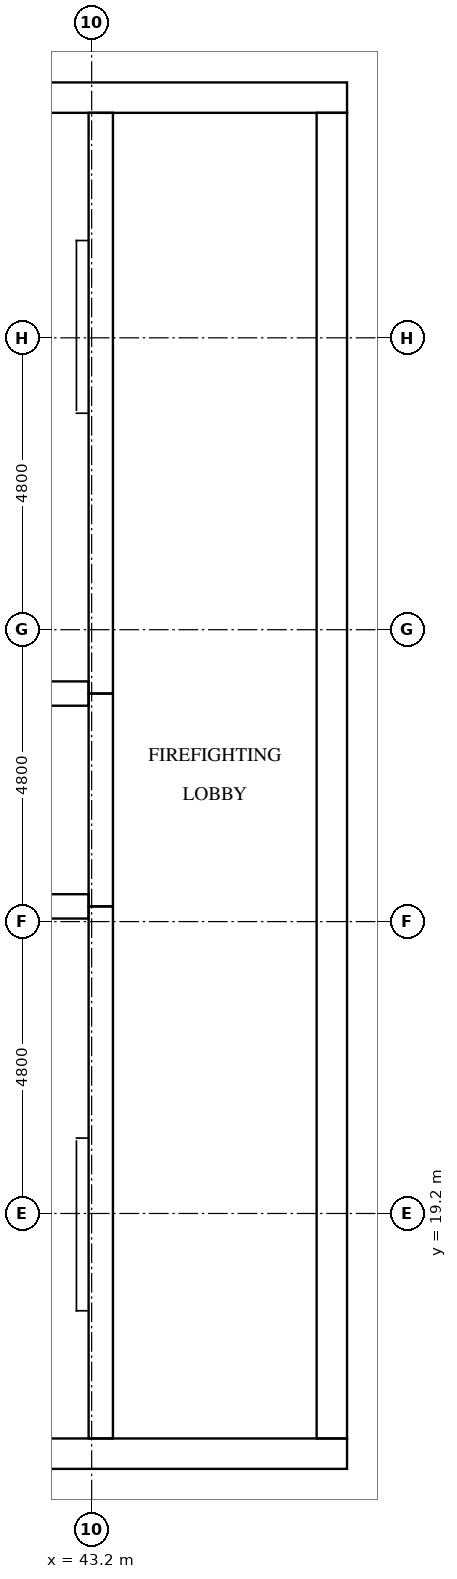
"""IFC4 building model, lengths in metres.
Left out: names, types, materials, properties, quantities, classifications, styles, units other than length and angle.
Written with IfcOpenShell. Run it as: python <this file> out.ifc"""

import sys

from ifc_helpers import new_model, si_unit, direction, frame, frame_2d, origin, place, context, subcontext, project, spatial, rectangle, extrude, element, fill, save


model = new_model("IFC4")
c1 = context("Model", 3, precision=1e-05, world=origin(), true_north=direction((0.0, 1.0)))
c2 = subcontext(c1, "Body", "Model", "MODEL_VIEW")
j1 = project(units=[si_unit("LENGTHUNIT", "METRE"), si_unit("PLANEANGLEUNIT", "RADIAN")], contexts=[c1])
p1 = place(None, origin())
s1 = spatial("IfcSite", under=j1, at=p1, CompositionType="ELEMENT")
p2 = place(p1, origin())
s2 = spatial("IfcBuilding", under=s1, at=p2, CompositionType="ELEMENT")
p3 = place(p2, frame((0.0, 0.0, 282.6)))
s3 = spatial("IfcBuildingStorey", under=s2, at=p3, CompositionType="ELEMENT", Elevation=282.6)
p4 = place(p3, frame((15.0, 15.25, 0.0), z_axis=(0.0, 0.0, 1.0), x_axis=(1.0, 0.0, 0.0)))
e1 = element("IfcWall", 1, at=p4, inside=s3, PredefinedType="SHEAR", context=c2, shape_type="SweptSolid", body=[
    extrude(rectangle(XDim=32.4, YDim=0.5, at=frame_2d((16.2, 0.0))), origin(), (0.0, 0.0, 1.0), 3.2),
])
p5 = place(p4, frame((15.3, 0.0, 0.0)))
e2 = element("IfcOpeningElement", 2, at=p5, cuts=e1, PredefinedType="OPENING", context=c2, shape_type="SweptSolid", body=[
    extrude(rectangle(XDim=1.8, YDim=2.1, at=frame_2d((0.9, 1.05))), frame((0.0, 0.26, 0.0), z_axis=(0.0, -1.0, 0.0), x_axis=(1.0, 0.0, 0.0)), (0.0, 0.0, 1.0), 0.52),
])
p6 = place(p3, frame((15.0, 37.55, 0.0), z_axis=(0.0, 0.0, 1.0), x_axis=(1.0, 0.0, 0.0)))
e3 = element("IfcWall", 3, at=p6, inside=s3, PredefinedType="SHEAR", context=c2, shape_type="SweptSolid", body=[
    extrude(rectangle(XDim=32.4, YDim=0.5, at=frame_2d((16.2, 0.0))), origin(), (0.0, 0.0, 1.0), 3.2),
])
p7 = place(p6, frame((15.3, 0.0, 0.0)))
e4 = element("IfcOpeningElement", 4, at=p7, cuts=e3, PredefinedType="OPENING", context=c2, shape_type="SweptSolid", body=[
    extrude(rectangle(XDim=1.8, YDim=2.1, at=frame_2d((0.9, 1.05))), frame((0.0, 0.26, 0.0), z_axis=(0.0, -1.0, 0.0), x_axis=(1.0, 0.0, 0.0)), (0.0, 0.0, 1.0), 0.52),
])
p8 = place(p6, frame((1.282, 0.0, 0.0)))
e5 = element("IfcOpeningElement", 5, at=p8, cuts=e3, PredefinedType="OPENING", context=c2, shape_type="SweptSolid", body=[
    extrude(rectangle(XDim=1.0, YDim=2.1, at=frame_2d((0.5, 1.05))), frame((0.0, 0.26, 0.0), z_axis=(0.0, -1.0, 0.0), x_axis=(1.0, 0.0, 0.0)), (0.0, 0.0, 1.0), 0.52),
])
p9 = place(p6, frame((5.082, 0.0, 0.0)))
e6 = element("IfcOpeningElement", 6, at=p9, cuts=e3, PredefinedType="OPENING", context=c2, shape_type="SweptSolid", body=[
    extrude(rectangle(XDim=1.0, YDim=2.1, at=frame_2d((0.5, 1.05))), frame((0.0, 0.26, 0.0), z_axis=(0.0, -1.0, 0.0), x_axis=(1.0, 0.0, 0.0)), (0.0, 0.0, 1.0), 0.52),
])
p10 = place(p3, frame((47.15, 15.5, 0.0), z_axis=(0.0, 0.0, 1.0), x_axis=(0.0, 1.0, 0.0)))
e7 = element("IfcWall", 7, at=p10, inside=s3, PredefinedType="SHEAR", context=c2, shape_type="SweptSolid", body=[
    extrude(rectangle(XDim=21.8, YDim=0.5, at=frame_2d((10.9, 0.0))), origin(), (0.0, 0.0, 1.0), 3.2),
])
p11 = place(p10, frame((10.6, 0.0, 0.0)))
e8 = element("IfcOpeningElement", 8, at=p11, cuts=e7, PredefinedType="OPENING", context=c2, shape_type="SweptSolid", body=[
    extrude(rectangle(XDim=1.2, YDim=2.1, at=frame_2d((0.6, 1.05))), frame((0.0, 0.26, 0.0), z_axis=(0.0, -1.0, 0.0), x_axis=(1.0, 0.0, 0.0)), (0.0, 0.0, 1.0), 0.52),
])
p12 = place(p3, frame((43.35, 15.5, 0.0), z_axis=(0.0, 0.0, 1.0), x_axis=(0.0, 1.0, 0.0)))
e9 = element("IfcWall", 9, at=p12, inside=s3, PredefinedType="SHEAR", context=c2, shape_type="SweptSolid", body=[
    extrude(rectangle(XDim=8.75, YDim=0.4, at=frame_2d((4.375, 0.0))), origin(), (0.0, 0.0, 1.0), 3.2),
])
p13 = place(p12, frame((0.7, 0.0, 0.0)))
e10 = element("IfcOpeningElement", 10, at=p13, cuts=e9, PredefinedType="OPENING", context=c2, shape_type="SweptSolid", body=[
    extrude(rectangle(XDim=1.2, YDim=2.1, at=frame_2d((0.6, 1.05))), frame((0.0, 0.21, 0.0), z_axis=(0.0, -1.0, 0.0), x_axis=(1.0, 0.0, 0.0)), (0.0, 0.0, 1.0), 0.42),
])
p14 = place(p3, frame((43.35, 24.25, 0.0), z_axis=(0.0, 0.0, 1.0), x_axis=(0.0, 1.0, 0.0)))
e11 = element("IfcWall", 11, at=p14, inside=s3, PredefinedType="SHEAR", context=c2, shape_type="SweptSolid", body=[
    extrude(rectangle(XDim=3.5, YDim=0.4, at=frame_2d((1.75, 0.0))), origin(), (0.0, 0.0, 1.0), 3.2),
])
p15 = place(p14, frame((1.2, 0.0, 0.0)))
e12 = element("IfcOpeningElement", 12, at=p15, cuts=e11, PredefinedType="OPENING", context=c2, shape_type="SweptSolid", body=[
    extrude(rectangle(XDim=1.1, YDim=2.1, at=frame_2d((0.55, 1.05))), frame((0.0, 0.21, 0.0), z_axis=(0.0, -1.0, 0.0), x_axis=(1.0, 0.0, 0.0)), (0.0, 0.0, 1.0), 0.42),
])
p16 = place(p3, frame((43.35, 27.75, 0.0), z_axis=(0.0, 0.0, 1.0), x_axis=(0.0, 1.0, 0.0)))
e13 = element("IfcWall", 13, at=p16, inside=s3, PredefinedType="SHEAR", context=c2, shape_type="SweptSolid", body=[
    extrude(rectangle(XDim=9.55, YDim=0.4, at=frame_2d((4.775, 0.0))), origin(), (0.0, 0.0, 1.0), 3.2),
])
p17 = place(p16, frame((7.65, 0.0, 0.0)))
e14 = element("IfcOpeningElement", 14, at=p17, cuts=e13, PredefinedType="OPENING", context=c2, shape_type="SweptSolid", body=[
    extrude(rectangle(XDim=1.2, YDim=2.1, at=frame_2d((0.6, 1.05))), frame((0.0, 0.21, 0.0), z_axis=(0.0, -1.0, 0.0), x_axis=(1.0, 0.0, 0.0)), (0.0, 0.0, 1.0), 0.42),
])
for number, where, z_axis, x_axis in (
    (15, (39.5, 24.25, 0.0), (0.0, 0.0, 1.0), (1.0, 0.0, 0.0)),
    (16, (39.5, 27.75, 0.0), (0.0, 0.0, 1.0), (1.0, 0.0, 0.0)),
):
    element("IfcWall", number, at=place(p3, frame(where, z_axis=z_axis, x_axis=x_axis)), inside=s3, PredefinedType="SHEAR", context=c2, shape_type="SweptSolid", body=[
        extrude(rectangle(XDim=3.65, YDim=0.4, at=frame_2d((1.825, 0.0))), origin(), (0.0, 0.0, 1.0), 3.2),
    ])
p18 = place(p15, origin())
e17 = element("IfcDoor", 17, at=p18, inside=s3, OperationType="DOUBLE_DOOR_SLIDING", PredefinedType="DOOR", context=c2, shape_type="SweptSolid", body=[
    extrude(rectangle(XDim=1.1, YDim=2.1, at=frame_2d((0.55, 1.05))), frame((0.0, 0.025, 0.0), z_axis=(0.0, -1.0, 0.0), x_axis=(1.0, 0.0, 0.0)), (0.0, 0.0, 1.0), 0.05),
])
fill(e12, e17)
p19 = place(p13, origin())
e18 = element("IfcDoor", 18, at=p19, inside=s3, OperationType="SINGLE_SWING_LEFT", PredefinedType="DOOR", context=c2, shape_type="SweptSolid", body=[
    extrude(rectangle(XDim=1.2, YDim=2.1, at=frame_2d((0.6, 1.05))), frame((0.0, 0.025, 0.0), z_axis=(0.0, -1.0, 0.0), x_axis=(1.0, 0.0, 0.0)), (0.0, 0.0, 1.0), 0.05),
])
fill(e10, e18)
p20 = place(p17, origin())
e19 = element("IfcDoor", 19, at=p20, inside=s3, OperationType="SINGLE_SWING_RIGHT", PredefinedType="DOOR", context=c2, shape_type="SweptSolid", body=[
    extrude(rectangle(XDim=1.2, YDim=2.1, at=frame_2d((0.6, 1.05))), frame((0.0, 0.025, 0.0), z_axis=(0.0, -1.0, 0.0), x_axis=(1.0, 0.0, 0.0)), (0.0, 0.0, 1.0), 0.05),
])
fill(e14, e19)
p21 = place(p11, origin())
e20 = element("IfcDoor", 20, at=p21, inside=s3, OperationType="SINGLE_SWING_RIGHT", PredefinedType="DOOR", context=c2, shape_type="SweptSolid", body=[
    extrude(rectangle(XDim=1.2, YDim=2.1, at=frame_2d((0.6, 1.05))), frame((0.0, 0.025, 0.0), z_axis=(0.0, -1.0, 0.0), x_axis=(1.0, 0.0, 0.0)), (0.0, 0.0, 1.0), 0.05),
])
fill(e8, e20)
save(model, sys.argv[1])
